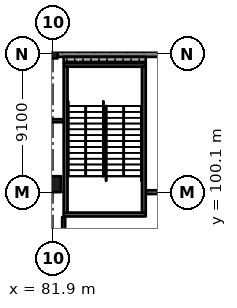
"""IFC4 building model, lengths in metres.
Left out: names, types, materials, properties, quantities, classifications, styles, units other than length and angle.
Written with IfcOpenShell. Run it as: python <this file> out.ifc"""

import sys

from ifc_helpers import new_model, si_unit, direction, frame, frame_2d, origin, origin_2d, place, context, subcontext, project, spatial, rectangle, extrude, element, fill, save


model = new_model("IFC4")
c1 = context("Model", 3, precision=1e-05, world=origin(), true_north=direction((0.0, 1.0)))
c2 = subcontext(c1, "Body", "Model", "MODEL_VIEW")
j1 = project(units=[si_unit("LENGTHUNIT", "METRE"), si_unit("PLANEANGLEUNIT", "RADIAN")], contexts=[c1])
p1 = place(None, origin())
s1 = spatial("IfcSite", under=j1, at=p1, CompositionType="ELEMENT")
p2 = place(p1, origin())
s2 = spatial("IfcBuilding", under=s1, at=p2, CompositionType="ELEMENT")
p3 = place(p2, origin())
s3 = spatial("IfcBuildingStorey", under=s2, at=p3, CompositionType="ELEMENT", Elevation=0.0)
p4 = place(p3, frame((81.9, 100.625, -0.4), z_axis=(0.0, 0.0, 1.0), x_axis=(1.0, 0.0, 0.0)))
e1 = element("IfcColumn", 1, at=p4, inside=s3, PredefinedType="COLUMN", context=c2, shape_type="SweptSolid", body=[
    extrude(rectangle(XDim=1.05, YDim=1.05, at=origin_2d()), origin(), (0.0, 0.0, 1.0), 6.77),
])
p5 = place(p3, frame((81.9, 109.2, -0.4), z_axis=(0.0, 0.0, 1.0), x_axis=(1.0, 0.0, 0.0)))
e2 = element("IfcColumn", 2, at=p5, inside=s3, PredefinedType="COLUMN", context=c2, shape_type="SweptSolid", body=[
    extrude(rectangle(XDim=0.6, YDim=0.6, at=origin_2d()), origin(), (0.0, 0.0, 1.0), 6.77),
])
p6 = place(p3, frame((88.0, 98.625, -0.4), z_axis=(0.0, 0.0, 1.0), x_axis=(-1.0, 0.0, 0.0)))
e3 = element("IfcWall", 3, at=p6, inside=s3, PredefinedType="SHEAR", context=c2, shape_type="SweptSolid", body=[
    extrude(rectangle(XDim=5.4, YDim=0.25, at=frame_2d((2.7, 0.0))), origin(), (0.0, 0.0, 1.0), 6.77),
])
p7 = place(p6, frame((1.5, 0.0, 0.4)))
e4 = element("IfcOpeningElement", 4, at=p7, cuts=e3, PredefinedType="OPENING", context=c2, shape_type="SweptSolid", body=[
    extrude(rectangle(XDim=2.4, YDim=2.1, at=frame_2d((1.2, 1.05))), frame((0.0, 0.135, 0.0), z_axis=(0.0, -1.0, 0.0), x_axis=(1.0, 0.0, 0.0)), (0.0, 0.0, 1.0), 0.27),
])
p8 = place(p3, frame((88.0, 108.475, -0.4), z_axis=(0.0, 0.0, 1.0), x_axis=(-1.0, 0.0, 0.0)))
e5 = element("IfcWall", 5, at=p8, inside=s3, PredefinedType="SHEAR", context=c2, shape_type="SweptSolid", body=[
    extrude(rectangle(XDim=5.4, YDim=0.25, at=frame_2d((2.7, 0.0))), origin(), (0.0, 0.0, 1.0), 6.77),
])
for number, where, z_axis, x_axis in (
    (6, (82.725, 108.35, -0.4), (0.0, 0.0, 1.0), (0.0, -1.0, 0.0)),
    (7, (87.875, 108.35, -0.4), (0.0, 0.0, 1.0), (0.0, -1.0, 0.0)),
):
    element("IfcWall", number, at=place(p3, frame(where, z_axis=z_axis, x_axis=x_axis)), inside=s3, PredefinedType="SHEAR", context=c2, shape_type="SweptSolid", body=[
        extrude(rectangle(XDim=9.6, YDim=0.25, at=frame_2d((4.8, 0.0))), origin(), (0.0, 0.0, 1.0), 6.77),
    ])
p9 = place(p3, frame((90.675, 109.175, 0.0), z_axis=(0.0, 0.0, 1.0), x_axis=(-1.0, 0.0, 0.0)))
e8 = element("IfcWall", 8, at=p9, inside=s3, PredefinedType="SOLIDWALL", context=c2, shape_type="SweptSolid", body=[
    extrude(rectangle(XDim=8.475, YDim=0.35, at=frame_2d((4.238, 0.0))), origin(), (0.0, 0.0, 1.0), 5.27),
])
p10 = place(p3, frame((82.6, 108.8, 0.0), z_axis=(0.0, 0.0, 1.0), x_axis=(1.0, 0.0, 0.0)))
e9 = element("IfcWall", 9, at=p10, inside=s3, PredefinedType="SOLIDWALL", context=c2, shape_type="SweptSolid", body=[
    extrude(rectangle(XDim=5.4, YDim=0.4, at=frame_2d((2.7, 0.0))), origin(), (0.0, 0.0, 1.0), 6.02),
])
p11 = place(p3, frame((60.73, 104.8, 0.0), z_axis=(0.0, 0.0, 1.0), x_axis=(1.0, 0.0, 0.0)))
e10 = element("IfcWall", 10, at=p11, inside=s3, PredefinedType="PARTITIONING", context=c2, shape_type="SweptSolid", body=[
    extrude(rectangle(XDim=21.84, YDim=0.2, at=frame_2d((10.92, 0.0))), origin(), (0.0, 0.0, 1.0), 6.02),
])
p12 = place(p11, frame((0.65, 0.0, 0.0)))
e11 = element("IfcOpeningElement", 11, at=p12, cuts=e10, PredefinedType="OPENING", context=c2, shape_type="SweptSolid", body=[
    extrude(rectangle(XDim=1.8, YDim=2.4, at=frame_2d((0.9, 1.2))), frame((0.0, 0.11, 0.0), z_axis=(0.0, -1.0, 0.0), x_axis=(1.0, 0.0, 0.0)), (0.0, 0.0, 1.0), 0.22),
])
p13 = place(p11, frame((3.75, 0.0, 0.0)))
e12 = element("IfcOpeningElement", 12, at=p13, cuts=e10, PredefinedType="OPENING", context=c2, shape_type="SweptSolid", body=[
    extrude(rectangle(XDim=1.8, YDim=2.4, at=frame_2d((0.9, 1.2))), frame((0.0, 0.11, 0.0), z_axis=(0.0, -1.0, 0.0), x_axis=(1.0, 0.0, 0.0)), (0.0, 0.0, 1.0), 0.22),
])
p14 = place(p11, frame((6.95, 0.0, 0.0)))
e13 = element("IfcOpeningElement", 13, at=p14, cuts=e10, PredefinedType="OPENING", context=c2, shape_type="SweptSolid", body=[
    extrude(rectangle(XDim=1.8, YDim=2.4, at=frame_2d((0.9, 1.2))), frame((0.0, 0.11, 0.0), z_axis=(0.0, -1.0, 0.0), x_axis=(1.0, 0.0, 0.0)), (0.0, 0.0, 1.0), 0.22),
])
p15 = place(p11, frame((10.05, 0.0, 0.0)))
e14 = element("IfcOpeningElement", 14, at=p15, cuts=e10, PredefinedType="OPENING", context=c2, shape_type="SweptSolid", body=[
    extrude(rectangle(XDim=1.8, YDim=2.4, at=frame_2d((0.9, 1.2))), frame((0.0, 0.11, 0.0), z_axis=(0.0, -1.0, 0.0), x_axis=(1.0, 0.0, 0.0)), (0.0, 0.0, 1.0), 0.22),
])
p16 = place(p11, frame((13.15, 0.0, 0.0)))
e15 = element("IfcOpeningElement", 15, at=p16, cuts=e10, PredefinedType="OPENING", context=c2, shape_type="SweptSolid", body=[
    extrude(rectangle(XDim=1.8, YDim=2.4, at=frame_2d((0.9, 1.2))), frame((0.0, 0.11, 0.0), z_axis=(0.0, -1.0, 0.0), x_axis=(1.0, 0.0, 0.0)), (0.0, 0.0, 1.0), 0.22),
])
p17 = place(p11, frame((16.25, 0.0, 0.0)))
e16 = element("IfcOpeningElement", 16, at=p17, cuts=e10, PredefinedType="OPENING", context=c2, shape_type="SweptSolid", body=[
    extrude(rectangle(XDim=1.8, YDim=2.4, at=frame_2d((0.9, 1.2))), frame((0.0, 0.11, 0.0), z_axis=(0.0, -1.0, 0.0), x_axis=(1.0, 0.0, 0.0)), (0.0, 0.0, 1.0), 0.22),
])
p18 = place(p11, frame((19.35, 0.0, 0.0)))
e17 = element("IfcOpeningElement", 17, at=p18, cuts=e10, PredefinedType="OPENING", context=c2, shape_type="SweptSolid", body=[
    extrude(rectangle(XDim=1.8, YDim=2.4, at=frame_2d((0.9, 1.2))), frame((0.0, 0.11, 0.0), z_axis=(0.0, -1.0, 0.0), x_axis=(1.0, 0.0, 0.0)), (0.0, 0.0, 1.0), 0.22),
])
p19 = place(p3, frame((82.6, 98.47, 0.0), z_axis=(0.0, 0.0, 1.0), x_axis=(0.0, -1.0, 0.0)))
e18 = element("IfcWall", 18, at=p19, inside=s3, PredefinedType="PARTITIONING", context=c2, shape_type="SweptSolid", body=[
    extrude(rectangle(XDim=7.37, YDim=0.2, at=frame_2d((3.685, 0.0))), origin(), (0.0, 0.0, 1.0), 6.02),
])
p20 = place(p19, frame((2.15, 0.0, 0.0)))
e19 = element("IfcOpeningElement", 19, at=p20, cuts=e18, PredefinedType="OPENING", context=c2, shape_type="SweptSolid", body=[
    extrude(rectangle(XDim=3.0, YDim=2.4, at=frame_2d((1.5, 1.2))), frame((0.0, 0.11, 0.0), z_axis=(0.0, -1.0, 0.0), x_axis=(1.0, 0.0, 0.0)), (0.0, 0.0, 1.0), 0.22),
])
p21 = place(p3, frame((88.03, 100.1, 0.0), z_axis=(0.0, 0.0, 1.0), x_axis=(1.0, 0.0, 0.0)))
e20 = element("IfcWall", 20, at=p21, inside=s3, PredefinedType="SOLIDWALL", context=c2, shape_type="SweptSolid", body=[
    extrude(rectangle(XDim=2.42, YDim=0.25, at=frame_2d((1.21, 0.0))), origin(), (0.0, 0.0, 1.0), 5.57),
])
p22 = place(p18, origin())
e21 = element("IfcDoor", 21, at=p22, inside=s3, OperationType="DOUBLE_DOOR_SINGLE_SWING", PredefinedType="DOOR", context=c2, shape_type="SweptSolid", body=[
    extrude(rectangle(XDim=1.8, YDim=2.4, at=frame_2d((0.9, 1.2))), frame((0.0, 0.025, 0.0), z_axis=(0.0, -1.0, 0.0), x_axis=(1.0, 0.0, 0.0)), (0.0, 0.0, 1.0), 0.05),
])
fill(e17, e21)
p23 = place(p7, origin())
e22 = element("IfcDoor", 22, at=p23, inside=s3, OperationType="DOUBLE_DOOR_SINGLE_SWING", PredefinedType="DOOR", context=c2, shape_type="SweptSolid", body=[
    extrude(rectangle(XDim=2.4, YDim=2.1, at=frame_2d((1.2, 1.05))), frame((0.0, 0.025, 0.0), z_axis=(0.0, -1.0, 0.0), x_axis=(1.0, 0.0, 0.0)), (0.0, 0.0, 1.0), 0.05),
])
fill(e4, e22)
save(model, sys.argv[1])
